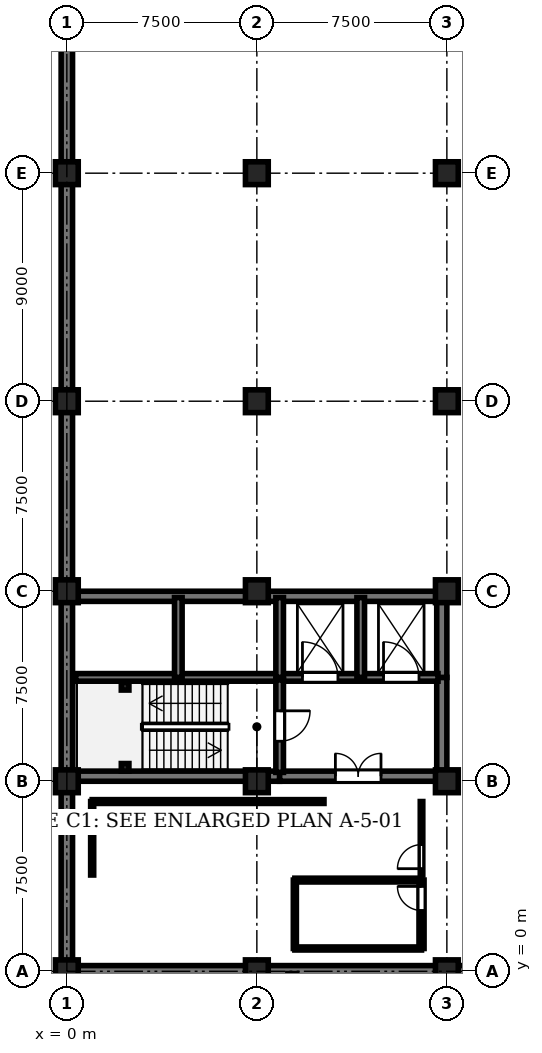
"""IFC4 building model, lengths in metres.
Left out: names, types, materials, properties, quantities, classifications, styles, units other than length and angle.
Written with IfcOpenShell. Run it as: python <this file> out.ifc"""

import sys

from ifc_helpers import new_model, si_unit, direction, frame, frame_2d, origin, origin_with_axes, origin_2d, place, context, subcontext, project, spatial, rectangle, circle, i_section, extrude, element, fill, save


model = new_model("IFC4")
c1 = context("Model", 3, precision=1e-05, world=origin(), true_north=direction((0.0, 1.0)))
c2 = subcontext(c1, "Body", "Model", "MODEL_VIEW")
j1 = project(units=[si_unit("LENGTHUNIT", "METRE"), si_unit("PLANEANGLEUNIT", "RADIAN")], contexts=[c1])
p1 = place(None, origin())
s1 = spatial("IfcSite", under=j1, at=p1, CompositionType="ELEMENT")
p2 = place(p1, origin())
s2 = spatial("IfcBuilding", under=s1, at=p2, CompositionType="ELEMENT")
p3 = place(p2, frame((0.0, 0.0, -4.5)))
s3 = spatial("IfcBuildingStorey", under=s2, at=p3, CompositionType="ELEMENT", Elevation=-4.5)
p4 = place(p3, origin_with_axes())
e1 = element("IfcColumn", 1, at=p4, inside=s3, PredefinedType="COLUMN", context=c2, shape_type="SweptSolid", body=[
    extrude(circle(Radius=0.45, at=origin_2d()), origin(), (0.0, 0.0, 1.0), 4.5),
])
for number, where, z_axis, x_axis in (
    (2, (0.0, 7.5, 0.0), (0.0, 0.0, 1.0), (1.0, 0.0, 0.0)),
    (3, (0.0, 15.0, 0.0), (0.0, 0.0, 1.0), (1.0, 0.0, 0.0)),
):
    element("IfcColumn", number, at=place(p3, frame(where, z_axis=z_axis, x_axis=x_axis)), inside=s3, PredefinedType="COLUMN", context=c2, shape_type="SweptSolid", body=[
        extrude(rectangle(XDim=0.9, YDim=0.9, at=origin_2d()), origin(), (0.0, 0.0, 1.0), 4.5),
    ])
p5 = place(p3, frame((0.0, 22.5, 0.0), z_axis=(0.0, 0.0, 1.0), x_axis=(1.0, 0.0, 0.0)))
e4 = element("IfcColumn", 4, at=p5, inside=s3, PredefinedType="COLUMN", context=c2, shape_type="SweptSolid", body=[
    extrude(circle(Radius=0.45, at=origin_2d()), origin(), (0.0, 0.0, 1.0), 4.5),
])
for number, where, z_axis, x_axis in (
    (5, (0.0, 31.5, 0.0), (0.0, 0.0, 1.0), (1.0, 0.0, 0.0)),
    (6, (7.5, 0.0, 0.0), (0.0, 0.0, 1.0), (1.0, 0.0, 0.0)),
    (7, (7.5, 7.5, 0.0), (0.0, 0.0, 1.0), (1.0, 0.0, 0.0)),
):
    element("IfcColumn", number, at=place(p3, frame(where, z_axis=z_axis, x_axis=x_axis)), inside=s3, PredefinedType="COLUMN", context=c2, shape_type="SweptSolid", body=[
        extrude(rectangle(XDim=0.9, YDim=0.9, at=origin_2d()), origin(), (0.0, 0.0, 1.0), 4.5),
    ])
p6 = place(p3, frame((7.5, 15.0, 0.0), z_axis=(0.0, 0.0, 1.0), x_axis=(1.0, 0.0, 0.0)))
e8 = element("IfcColumn", 8, at=p6, inside=s3, PredefinedType="COLUMN", context=c2, shape_type="SweptSolid", body=[
    extrude(circle(Radius=0.45, at=origin_2d()), origin(), (0.0, 0.0, 1.0), 4.5),
])
for number, where, z_axis, x_axis in (
    (9, (7.5, 22.5, 0.0), (0.0, 0.0, 1.0), (1.0, 0.0, 0.0)),
    (10, (7.5, 31.5, 0.0), (0.0, 0.0, 1.0), (1.0, 0.0, 0.0)),
    (11, (15.0, 0.0, 0.0), (0.0, 0.0, 1.0), (1.0, 0.0, 0.0)),
):
    element("IfcColumn", number, at=place(p3, frame(where, z_axis=z_axis, x_axis=x_axis)), inside=s3, PredefinedType="COLUMN", context=c2, shape_type="SweptSolid", body=[
        extrude(rectangle(XDim=0.9, YDim=0.9, at=origin_2d()), origin(), (0.0, 0.0, 1.0), 4.5),
    ])
p7 = place(p3, frame((15.0, 7.5, 0.0), z_axis=(0.0, 0.0, 1.0), x_axis=(1.0, 0.0, 0.0)))
e12 = element("IfcColumn", 12, at=p7, inside=s3, PredefinedType="COLUMN", context=c2, shape_type="SweptSolid", body=[
    extrude(circle(Radius=0.45, at=origin_2d()), origin(), (0.0, 0.0, 1.0), 4.5),
])
for number, where, z_axis, x_axis in (
    (13, (15.0, 15.0, 0.0), (0.0, 0.0, 1.0), (1.0, 0.0, 0.0)),
    (14, (15.0, 22.5, 0.0), (0.0, 0.0, 1.0), (1.0, 0.0, 0.0)),
):
    element("IfcColumn", number, at=place(p3, frame(where, z_axis=z_axis, x_axis=x_axis)), inside=s3, PredefinedType="COLUMN", context=c2, shape_type="SweptSolid", body=[
        extrude(rectangle(XDim=0.9, YDim=0.9, at=origin_2d()), origin(), (0.0, 0.0, 1.0), 4.5),
    ])
p8 = place(p3, frame((15.0, 31.5, 0.0), z_axis=(0.0, 0.0, 1.0), x_axis=(1.0, 0.0, 0.0)))
e15 = element("IfcColumn", 15, at=p8, inside=s3, PredefinedType="COLUMN", context=c2, shape_type="SweptSolid", body=[
    extrude(circle(Radius=0.45, at=origin_2d()), origin(), (0.0, 0.0, 1.0), 4.5),
])
p9 = place(p3, frame((8.9, -0.34, 0.0), z_axis=(0.0, 0.0, 1.0), x_axis=(1.0, 0.0, 0.0)))
e16 = element("IfcColumn", 16, at=p9, inside=s3, PredefinedType="PILASTER", context=c2, shape_type="SweptSolid", body=[
    extrude(rectangle(XDim=0.35, YDim=0.5, at=origin_2d()), origin(), (0.0, 0.0, 1.0), 4.5),
])
for number, where, z_axis, x_axis in (
    (17, (22.5, 0.0, 0.0), (0.0, 0.0, 1.0), (-1.0, 0.0, 0.0)),
    (18, (15.0, 0.0, 0.0), (0.0, 0.0, 1.0), (-1.0, 0.0, 0.0)),
    (19, (7.5, 0.0, 0.0), (0.0, 0.0, 1.0), (-1.0, 0.0, 0.0)),
    (20, (0.0, 0.0, 0.0), (0.0, 0.0, 1.0), (0.0, 1.0, 0.0)),
    (21, (0.0, 7.5, 0.0), (0.0, 0.0, 1.0), (0.0, 1.0, 0.0)),
    (22, (0.0, 15.0, 0.0), (0.0, 0.0, 1.0), (0.0, 1.0, 0.0)),
):
    element("IfcWall", number, at=place(p3, frame(where, z_axis=z_axis, x_axis=x_axis)), inside=s3, PredefinedType="SOLIDWALL", context=c2, shape_type="SweptSolid", body=[
        extrude(rectangle(XDim=7.5, YDim=0.45, at=frame_2d((3.75, 0.0))), origin(), (0.0, 0.0, 1.0), 4.14),
    ])
p10 = place(p3, frame((0.0, 22.5, 0.0), z_axis=(0.0, 0.0, 1.0), x_axis=(0.0, 1.0, 0.0)))
e23 = element("IfcWall", 23, at=p10, inside=s3, PredefinedType="SOLIDWALL", context=c2, shape_type="SweptSolid", body=[
    extrude(rectangle(XDim=9.0, YDim=0.45, at=frame_2d((4.5, 0.0))), origin(), (0.0, 0.0, 1.0), 4.14),
])
p11 = place(p3, frame((0.0, 31.5, 0.0), z_axis=(0.0, 0.0, 1.0), x_axis=(0.0, 1.0, 0.0)))
e24 = element("IfcWall", 24, at=p11, inside=s3, PredefinedType="SOLIDWALL", context=c2, shape_type="SweptSolid", body=[
    extrude(rectangle(XDim=7.5, YDim=0.45, at=frame_2d((3.75, 0.0))), origin(), (0.0, 0.0, 1.0), 4.14),
])
for number, where, z_axis, x_axis in (
    (25, (2.3, 8.05, 0.0), (0.0, 0.0, 1.0), (1.0, 0.0, 0.0)),
    (26, (2.3, 11.25, 0.0), (0.0, 0.0, 1.0), (1.0, 0.0, 0.0)),
):
    element("IfcColumn", number, at=place(p3, frame(where, z_axis=z_axis, x_axis=x_axis)), inside=s3, PredefinedType="COLUMN", context=c2, shape_type="SweptSolid", body=[
        extrude(i_section(OverallWidth=0.3, OverallDepth=0.3, WebThickness=0.011, FlangeThickness=0.019, FilletRadius=0.027, at=origin_2d()), origin(), (0.0, 0.0, 1.0), 4.5),
    ])
p12 = place(p3, frame((0.35, 7.7, 0.0), z_axis=(0.0, 0.0, 1.0), x_axis=(1.0, 0.0, 0.0)))
e27 = element("IfcWall", 27, at=p12, inside=s3, PredefinedType="SHEAR", context=c2, shape_type="SweptSolid", body=[
    extrude(rectangle(XDim=8.05, YDim=0.4, at=frame_2d((4.025, 0.0))), origin(), (0.0, 0.0, 1.0), 4.14),
])
p13 = place(p3, frame((8.4, 7.7, 0.0), z_axis=(0.0, 0.0, 1.0), x_axis=(1.0, 0.0, 0.0)))
e28 = element("IfcWall", 28, at=p13, inside=s3, PredefinedType="SHEAR", context=c2, shape_type="SweptSolid", body=[
    extrude(rectangle(XDim=6.25, YDim=0.4, at=frame_2d((3.125, 0.0))), origin(), (0.0, 0.0, 1.0), 4.14),
])
p14 = place(p13, frame((2.2, 0.0, 0.0)))
e29 = element("IfcOpeningElement", 29, at=p14, cuts=e28, PredefinedType="OPENING", context=c2, shape_type="SweptSolid", body=[
    extrude(rectangle(XDim=1.8, YDim=2.25, at=frame_2d((0.9, 1.125))), frame((0.0, 0.21, 0.0), z_axis=(0.0, -1.0, 0.0), x_axis=(1.0, 0.0, 0.0)), (0.0, 0.0, 1.0), 0.42),
])
p15 = place(p3, frame((0.35, 14.8, 0.0), z_axis=(0.0, 0.0, 1.0), x_axis=(1.0, 0.0, 0.0)))
e30 = element("IfcWall", 30, at=p15, inside=s3, PredefinedType="SHEAR", context=c2, shape_type="SweptSolid", body=[
    extrude(rectangle(XDim=14.3, YDim=0.4, at=frame_2d((7.15, 0.0))), origin(), (0.0, 0.0, 1.0), 4.14),
])
p16 = place(p3, frame((14.8, 7.85, 0.0), z_axis=(0.0, 0.0, 1.0), x_axis=(0.0, 1.0, 0.0)))
e31 = element("IfcWall", 31, at=p16, inside=s3, PredefinedType="SHEAR", context=c2, shape_type="SweptSolid", body=[
    extrude(rectangle(XDim=3.75, YDim=0.4, at=frame_2d((1.875, 0.0))), origin(), (0.0, 0.0, 1.0), 4.14),
])
p17 = place(p3, frame((14.8, 11.6, 0.0), z_axis=(0.0, 0.0, 1.0), x_axis=(0.0, 1.0, 0.0)))
e32 = element("IfcWall", 32, at=p17, inside=s3, PredefinedType="SHEAR", context=c2, shape_type="SweptSolid", body=[
    extrude(rectangle(XDim=3.05, YDim=0.4, at=frame_2d((1.525, 0.0))), origin(), (0.0, 0.0, 1.0), 4.14),
])
p18 = place(p3, frame((0.35, 11.6, 0.0), z_axis=(0.0, 0.0, 1.0), x_axis=(1.0, 0.0, 0.0)))
e33 = element("IfcWall", 33, at=p18, inside=s3, PredefinedType="SHEAR", context=c2, shape_type="SweptSolid", body=[
    extrude(rectangle(XDim=8.05, YDim=0.3, at=frame_2d((4.025, 0.0))), origin(), (0.0, 0.0, 1.0), 4.14),
])
p19 = place(p3, frame((8.4, 11.6, 0.0), z_axis=(0.0, 0.0, 1.0), x_axis=(1.0, 0.0, 0.0)))
e34 = element("IfcWall", 34, at=p19, inside=s3, PredefinedType="SHEAR", context=c2, shape_type="SweptSolid", body=[
    extrude(rectangle(XDim=6.25, YDim=0.3, at=frame_2d((3.125, 0.0))), origin(), (0.0, 0.0, 1.0), 4.14),
])
p20 = place(p19, frame((0.9, 0.0, 0.0)))
e35 = element("IfcOpeningElement", 35, at=p20, cuts=e34, PredefinedType="OPENING", context=c2, shape_type="SweptSolid", body=[
    extrude(rectangle(XDim=1.4, YDim=2.25, at=frame_2d((0.7, 1.125))), frame((0.0, 0.16, 0.0), z_axis=(0.0, -1.0, 0.0), x_axis=(1.0, 0.0, 0.0)), (0.0, 0.0, 1.0), 0.32),
])
p21 = place(p19, frame((4.1, 0.0, 0.0)))
e36 = element("IfcOpeningElement", 36, at=p21, cuts=e34, PredefinedType="OPENING", context=c2, shape_type="SweptSolid", body=[
    extrude(rectangle(XDim=1.4, YDim=2.25, at=frame_2d((0.7, 1.125))), frame((0.0, 0.16, 0.0), z_axis=(0.0, -1.0, 0.0), x_axis=(1.0, 0.0, 0.0)), (0.0, 0.0, 1.0), 0.32),
])
p22 = place(p3, frame((8.4, 11.5, 0.0), z_axis=(0.0, 0.0, 1.0), x_axis=(0.0, -1.0, 0.0)))
e37 = element("IfcWall", 37, at=p22, inside=s3, PredefinedType="SHEAR", context=c2, shape_type="SweptSolid", body=[
    extrude(rectangle(XDim=3.65, YDim=0.3, at=frame_2d((1.825, 0.0))), origin(), (0.0, 0.0, 1.0), 4.14),
])
p23 = place(p22, frame((1.22, 0.0, 0.0)))
e38 = element("IfcOpeningElement", 38, at=p23, cuts=e37, PredefinedType="OPENING", context=c2, shape_type="SweptSolid", body=[
    extrude(rectangle(XDim=1.2, YDim=2.25, at=frame_2d((0.6, 1.125))), frame((0.0, 0.16, 0.0), z_axis=(0.0, -1.0, 0.0), x_axis=(1.0, 0.0, 0.0)), (0.0, 0.0, 1.0), 0.32),
])
for number, where, z_axis, x_axis in (
    (39, (4.4, 11.6, 0.0), (0.0, 0.0, 1.0), (0.0, 1.0, 0.0)),
    (40, (8.4, 11.6, 0.0), (0.0, 0.0, 1.0), (0.0, 1.0, 0.0)),
    (41, (11.6, 11.6, 0.0), (0.0, 0.0, 1.0), (0.0, 1.0, 0.0)),
):
    element("IfcWall", number, at=place(p3, frame(where, z_axis=z_axis, x_axis=x_axis)), inside=s3, PredefinedType="SHEAR", context=c2, shape_type="SweptSolid", body=[
        extrude(rectangle(XDim=3.15, YDim=0.3, at=frame_2d((1.575, 0.0))), origin(), (0.0, 0.0, 1.0), 4.14),
    ])
p24 = place(p3, frame((14.0, 0.9, 0.0), z_axis=(0.0, 0.0, 1.0), x_axis=(0.0, 1.0, 0.0)))
e42 = element("IfcWall", 42, at=p24, inside=s3, PredefinedType="STANDARD", context=c2, shape_type="SweptSolid", body=[
    extrude(rectangle(XDim=2.7, YDim=0.2, at=frame_2d((1.35, 0.0))), origin(), (0.0, 0.0, 1.0), 4.125),
])
p25 = place(p24, frame((1.5, 0.0, 0.0)))
e43 = element("IfcOpeningElement", 43, at=p25, cuts=e42, PredefinedType="OPENING", context=c2, shape_type="SweptSolid", body=[
    extrude(rectangle(XDim=0.95, YDim=2.15, at=frame_2d((0.475, 1.075))), frame((0.0, 0.11, 0.0), z_axis=(0.0, -1.0, 0.0), x_axis=(1.0, 0.0, 0.0)), (0.0, 0.0, 1.0), 0.22),
])
p26 = place(p3, frame((14.0, 3.8, 0.0), z_axis=(0.0, 0.0, 1.0), x_axis=(0.0, 1.0, 0.0)))
e44 = element("IfcWall", 44, at=p26, inside=s3, PredefinedType="PARTITIONING", context=c2, shape_type="SweptSolid", body=[
    extrude(rectangle(XDim=2.9, YDim=0.1, at=frame_2d((1.45, 0.0))), origin(), (0.0, 0.0, 1.0), 4.125),
])
p27 = place(p26, frame((0.25, 0.0, 0.0)))
e45 = element("IfcOpeningElement", 45, at=p27, cuts=e44, PredefinedType="OPENING", context=c2, shape_type="SweptSolid", body=[
    extrude(rectangle(XDim=0.95, YDim=2.15, at=frame_2d((0.475, 1.075))), frame((0.0, 0.06, 0.0), z_axis=(0.0, -1.0, 0.0), x_axis=(1.0, 0.0, 0.0)), (0.0, 0.0, 1.0), 0.12),
])
p28 = place(p3, frame((9.0, 3.6, 0.0), z_axis=(0.0, 0.0, 1.0), x_axis=(1.0, 0.0, 0.0)))
e46 = element("IfcWall", 46, at=p28, inside=s3, PredefinedType="PARTITIONING", context=c2, shape_type="SweptSolid", body=[
    extrude(rectangle(XDim=5.0, YDim=0.15, at=frame_2d((2.5, 0.0))), origin(), (0.0, 0.0, 1.0), 4.125),
])
p29 = place(p3, frame((1.0, 6.7, 0.0), z_axis=(0.0, 0.0, 1.0), x_axis=(1.0, 0.0, 0.0)))
e47 = element("IfcWall", 47, at=p29, inside=s3, PredefinedType="PARTITIONING", context=c2, shape_type="SweptSolid", body=[
    extrude(rectangle(XDim=9.15, YDim=0.15, at=frame_2d((4.575, 0.0))), origin(), (0.0, 0.0, 1.0), 4.125),
])
p30 = place(p3, frame((9.0, 0.9, 0.0), z_axis=(0.0, 0.0, 1.0), x_axis=(1.0, 0.0, 0.0)))
e48 = element("IfcWall", 48, at=p30, inside=s3, PredefinedType="PARTITIONING", context=c2, shape_type="SweptSolid", body=[
    extrude(rectangle(XDim=5.0, YDim=0.12, at=frame_2d((2.5, 0.0))), origin(), (0.0, 0.0, 1.0), 4.125),
])
p31 = place(p3, frame((9.0, 0.9, 0.0), z_axis=(0.0, 0.0, 1.0), x_axis=(0.0, 1.0, 0.0)))
e49 = element("IfcWall", 49, at=p31, inside=s3, PredefinedType="PARTITIONING", context=c2, shape_type="SweptSolid", body=[
    extrude(rectangle(XDim=2.7, YDim=0.12, at=frame_2d((1.35, 0.0))), origin(), (0.0, 0.0, 1.0), 4.125),
])
p32 = place(p3, frame((1.0, 3.8, 0.0), z_axis=(0.0, 0.0, 1.0), x_axis=(0.0, 1.0, 0.0)))
e50 = element("IfcWall", 50, at=p32, inside=s3, PredefinedType="PARTITIONING", context=c2, shape_type="SweptSolid", body=[
    extrude(rectangle(XDim=2.9, YDim=0.12, at=frame_2d((1.45, 0.0))), origin(), (0.0, 0.0, 1.0), 4.125),
])
p33 = place(p14, origin())
e51 = element("IfcDoor", 51, at=p33, inside=s3, OperationType="DOUBLE_DOOR_SINGLE_SWING", PredefinedType="DOOR", context=c2, shape_type="SweptSolid", body=[
    extrude(rectangle(XDim=1.8, YDim=2.25, at=frame_2d((0.9, 1.125))), frame((0.0, 0.025, 0.0), z_axis=(0.0, -1.0, 0.0), x_axis=(1.0, 0.0, 0.0)), (0.0, 0.0, 1.0), 0.05),
])
fill(e29, e51)
p34 = place(p20, origin())
e52 = element("IfcDoor", 52, at=p34, inside=s3, OperationType="DOUBLE_DOOR_SLIDING", PredefinedType="DOOR", context=c2, shape_type="SweptSolid", body=[
    extrude(rectangle(XDim=1.4, YDim=2.25, at=frame_2d((0.7, 1.125))), frame((0.0, 0.025, 0.0), z_axis=(0.0, -1.0, 0.0), x_axis=(1.0, 0.0, 0.0)), (0.0, 0.0, 1.0), 0.05),
])
fill(e35, e52)
p35 = place(p21, origin())
e53 = element("IfcDoor", 53, at=p35, inside=s3, OperationType="DOUBLE_DOOR_SLIDING", PredefinedType="DOOR", context=c2, shape_type="SweptSolid", body=[
    extrude(rectangle(XDim=1.4, YDim=2.25, at=frame_2d((0.7, 1.125))), frame((0.0, 0.025, 0.0), z_axis=(0.0, -1.0, 0.0), x_axis=(1.0, 0.0, 0.0)), (0.0, 0.0, 1.0), 0.05),
])
fill(e36, e53)
p36 = place(p23, origin())
e54 = element("IfcDoor", 54, at=p36, inside=s3, OperationType="SINGLE_SWING_LEFT", PredefinedType="DOOR", context=c2, shape_type="SweptSolid", body=[
    extrude(rectangle(XDim=1.2, YDim=2.25, at=frame_2d((0.6, 1.125))), frame((0.0, 0.025, 0.0), z_axis=(0.0, -1.0, 0.0), x_axis=(1.0, 0.0, 0.0)), (0.0, 0.0, 1.0), 0.05),
])
fill(e38, e54)
p37 = place(p25, origin())
e55 = element("IfcDoor", 55, at=p37, inside=s3, OperationType="SINGLE_SWING_RIGHT", PredefinedType="DOOR", context=c2, shape_type="SweptSolid", body=[
    extrude(rectangle(XDim=0.95, YDim=2.15, at=frame_2d((0.475, 1.075))), frame((0.0, 0.025, 0.0), z_axis=(0.0, -1.0, 0.0), x_axis=(1.0, 0.0, 0.0)), (0.0, 0.0, 1.0), 0.05),
])
fill(e43, e55)
p38 = place(p27, origin())
e56 = element("IfcDoor", 56, at=p38, inside=s3, OperationType="SINGLE_SWING_LEFT", PredefinedType="DOOR", context=c2, shape_type="SweptSolid", body=[
    extrude(rectangle(XDim=0.95, YDim=2.15, at=frame_2d((0.475, 1.075))), frame((0.0, 0.025, 0.0), z_axis=(0.0, -1.0, 0.0), x_axis=(1.0, 0.0, 0.0)), (0.0, 0.0, 1.0), 0.05),
])
fill(e45, e56)
save(model, sys.argv[1])
